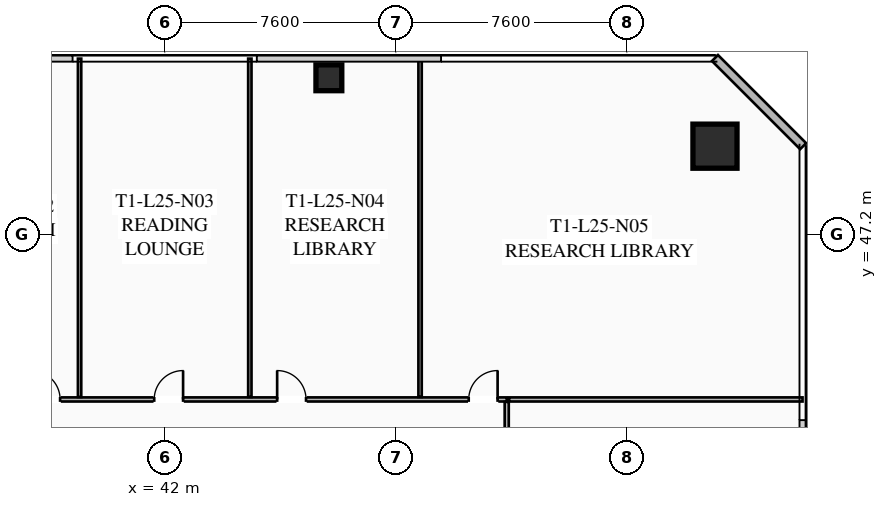
"""IFC4 building model, lengths in metres.
Left out: names, types, materials, properties, quantities, classifications, styles, units other than length and angle.
Written with IfcOpenShell. Run it as: python <this file> out.ifc"""

import sys

from ifc_helpers import new_model, si_unit, direction, frame, frame_2d, origin, origin_2d, place, context, subcontext, project, spatial, rectangle, hollow_rectangle, extrude, element, fill, save


model = new_model("IFC4")
c1 = context("Model", 3, precision=1e-05, world=origin(), true_north=direction((0.0, 1.0)))
c2 = subcontext(c1, "Body", "Model", "MODEL_VIEW")
j1 = project(units=[si_unit("LENGTHUNIT", "METRE"), si_unit("PLANEANGLEUNIT", "RADIAN")], contexts=[c1])
p1 = place(None, origin())
s1 = spatial("IfcSite", under=j1, at=p1, CompositionType="ELEMENT")
p2 = place(p1, origin())
s2 = spatial("IfcBuilding", under=s1, at=p2, CompositionType="ELEMENT")
p3 = place(p2, frame((0.0, 0.0, 95.6)))
s3 = spatial("IfcBuildingStorey", under=s2, at=p3, CompositionType="ELEMENT", Elevation=95.6)
p4 = place(p3, frame((60.1, 50.1, 0.0), z_axis=(0.0, 0.0, 1.0), x_axis=(1.0, 0.0, 0.0)))
e1 = element("IfcColumn", 1, at=p4, inside=s3, PredefinedType="COLUMN", context=c2, shape_type="SweptSolid", body=[
    extrude(hollow_rectangle(XDim=1.45, YDim=1.45, WallThickness=0.055, at=origin_2d()), origin(), (0.0, 0.0, 1.0), 3.35),
])
p5 = place(p3, frame((47.4, 52.35, 0.0), z_axis=(0.0, 0.0, 1.0), x_axis=(1.0, 0.0, 0.0)))
e2 = element("IfcColumn", 2, at=p5, inside=s3, PredefinedType="COLUMN", context=c2, shape_type="SweptSolid", body=[
    extrude(hollow_rectangle(XDim=0.85, YDim=0.85, WallThickness=0.035, at=origin_2d()), origin(), (0.0, 0.0, 1.0), 3.35),
])
p6 = place(p3, frame((60.1, 53.0, 0.0), z_axis=(0.0, 0.0, 1.0), x_axis=(0.707106781187, -0.707106781187, 0.0)))
e3 = element("IfcWall", 3, at=p6, inside=s3, PredefinedType="SOLIDWALL", context=c2, shape_type="SweptSolid", body=[
    extrude(rectangle(XDim=4.101, YDim=0.28, at=frame_2d((2.051, 0.0))), origin(), (0.0, 0.0, 1.0), 3.35),
])
p7 = place(p3, frame((24.05, 41.77, 0.0), z_axis=(0.0, 0.0, 1.0), x_axis=(1.0, 0.0, 0.0)))
e4 = element("IfcWall", 4, at=p7, inside=s3, PredefinedType="PARTITIONING", context=c2, shape_type="SweptSolid", body=[
    extrude(rectangle(XDim=29.2, YDim=0.135, at=frame_2d((14.6, 0.0))), origin(), (0.0, 0.0, 1.0), 2.703),
])
p8 = place(p7, frame((0.3, 0.0, 0.0)))
e5 = element("IfcOpeningElement", 5, at=p8, cuts=e4, PredefinedType="OPENING", context=c2, shape_type="SweptSolid", body=[
    extrude(rectangle(XDim=0.95, YDim=2.05, at=frame_2d((0.475, 1.025))), frame((0.0, 0.077, 0.0), z_axis=(0.0, -1.0, 0.0), x_axis=(1.0, 0.0, 0.0)), (0.0, 0.0, 1.0), 0.155),
])
p9 = place(p7, frame((13.559, 0.0, 0.0)))
e6 = element("IfcOpeningElement", 6, at=p9, cuts=e4, PredefinedType="OPENING", context=c2, shape_type="SweptSolid", body=[
    extrude(rectangle(XDim=0.95, YDim=2.05, at=frame_2d((0.475, 1.025))), frame((0.0, 0.077, 0.0), z_axis=(0.0, -1.0, 0.0), x_axis=(1.0, 0.0, 0.0)), (0.0, 0.0, 1.0), 0.155),
])
p10 = place(p7, frame((17.605, 0.0, 0.0)))
e7 = element("IfcOpeningElement", 7, at=p10, cuts=e4, PredefinedType="OPENING", context=c2, shape_type="SweptSolid", body=[
    extrude(rectangle(XDim=0.95, YDim=2.05, at=frame_2d((0.475, 1.025))), frame((0.0, 0.077, 0.0), z_axis=(0.0, -1.0, 0.0), x_axis=(1.0, 0.0, 0.0)), (0.0, 0.0, 1.0), 0.155),
])
p11 = place(p7, frame((21.649, 0.0, 0.0)))
e8 = element("IfcOpeningElement", 8, at=p11, cuts=e4, PredefinedType="OPENING", context=c2, shape_type="SweptSolid", body=[
    extrude(rectangle(XDim=0.95, YDim=2.05, at=frame_2d((0.475, 1.025))), frame((0.0, 0.077, 0.0), z_axis=(0.0, -1.0, 0.0), x_axis=(1.0, 0.0, 0.0)), (0.0, 0.0, 1.0), 0.155),
])
p12 = place(p7, frame((27.95, 0.0, 0.0)))
e9 = element("IfcOpeningElement", 9, at=p12, cuts=e4, PredefinedType="OPENING", context=c2, shape_type="SweptSolid", body=[
    extrude(rectangle(XDim=0.95, YDim=2.05, at=frame_2d((0.475, 1.025))), frame((0.0, 0.077, 0.0), z_axis=(0.0, -1.0, 0.0), x_axis=(1.0, 0.0, 0.0)), (0.0, 0.0, 1.0), 0.155),
])
for number, where, z_axis, x_axis in (
    (10, (39.2, 41.85, 0.0), (0.0, 0.0, 1.0), (0.0, 1.0, 0.0)),
    (11, (44.8, 41.85, 0.0), (0.0, 0.0, 1.0), (0.0, 1.0, 0.0)),
    (12, (50.4, 41.85, 0.0), (0.0, 0.0, 1.0), (0.0, 1.0, 0.0)),
):
    element("IfcWall", number, at=place(p3, frame(where, z_axis=z_axis, x_axis=x_axis)), inside=s3, PredefinedType="PARTITIONING", context=c2, shape_type="SweptSolid", body=[
        extrude(rectangle(XDim=11.13, YDim=0.11, at=frame_2d((5.565, 0.0))), origin(), (0.0, 0.0, 1.0), 2.703),
    ])
p13 = place(p3, frame((53.25, 41.69, 0.0), z_axis=(0.0, 0.0, 1.0), x_axis=(0.0, -1.0, 0.0)))
e13 = element("IfcWall", 13, at=p13, inside=s3, PredefinedType="PARTITIONING", context=c2, shape_type="SweptSolid", body=[
    extrude(rectangle(XDim=20.11, YDim=0.135, at=frame_2d((10.055, 0.0))), origin(), (0.0, 0.0, 1.0), 2.703),
])
p14 = place(p13, frame((9.078, 0.0, 0.0)))
e14 = element("IfcOpeningElement", 14, at=p14, cuts=e13, PredefinedType="OPENING", context=c2, shape_type="SweptSolid", body=[
    extrude(rectangle(XDim=0.95, YDim=2.05, at=frame_2d((0.475, 1.025))), frame((0.0, 0.077, 0.0), z_axis=(0.0, -1.0, 0.0), x_axis=(1.0, 0.0, 0.0)), (0.0, 0.0, 1.0), 0.155),
])
p15 = place(p3, frame((62.98, 41.77, 0.0), z_axis=(0.0, 0.0, 1.0), x_axis=(-1.0, 0.0, 0.0)))
e15 = element("IfcWall", 15, at=p15, inside=s3, PredefinedType="PARTITIONING", context=c2, shape_type="SweptSolid", body=[
    extrude(rectangle(XDim=9.65, YDim=0.135, at=frame_2d((4.825, 0.0))), origin(), (0.0, 0.0, 1.0), 2.703),
])
p16 = place(p9, origin())
e16 = element("IfcDoor", 16, at=p16, inside=s3, OperationType="SINGLE_SWING_LEFT", PredefinedType="DOOR", context=c2, shape_type="SweptSolid", body=[
    extrude(rectangle(XDim=0.95, YDim=2.05, at=frame_2d((0.475, 1.025))), frame((0.0, 0.025, 0.0), z_axis=(0.0, -1.0, 0.0), x_axis=(1.0, 0.0, 0.0)), (0.0, 0.0, 1.0), 0.05),
])
fill(e6, e16)
p17 = place(p10, origin())
e17 = element("IfcDoor", 17, at=p17, inside=s3, OperationType="SINGLE_SWING_RIGHT", PredefinedType="DOOR", context=c2, shape_type="SweptSolid", body=[
    extrude(rectangle(XDim=0.95, YDim=2.05, at=frame_2d((0.475, 1.025))), frame((0.0, 0.025, 0.0), z_axis=(0.0, -1.0, 0.0), x_axis=(1.0, 0.0, 0.0)), (0.0, 0.0, 1.0), 0.05),
])
fill(e7, e17)
p18 = place(p11, origin())
e18 = element("IfcDoor", 18, at=p18, inside=s3, OperationType="SINGLE_SWING_LEFT", PredefinedType="DOOR", context=c2, shape_type="SweptSolid", body=[
    extrude(rectangle(XDim=0.95, YDim=2.05, at=frame_2d((0.475, 1.025))), frame((0.0, 0.025, 0.0), z_axis=(0.0, -1.0, 0.0), x_axis=(1.0, 0.0, 0.0)), (0.0, 0.0, 1.0), 0.05),
])
fill(e8, e18)
p19 = place(p12, origin())
e19 = element("IfcDoor", 19, at=p19, inside=s3, OperationType="SINGLE_SWING_RIGHT", PredefinedType="DOOR", context=c2, shape_type="SweptSolid", body=[
    extrude(rectangle(XDim=0.95, YDim=2.05, at=frame_2d((0.475, 1.025))), frame((0.0, 0.025, 0.0), z_axis=(0.0, -1.0, 0.0), x_axis=(1.0, 0.0, 0.0)), (0.0, 0.0, 1.0), 0.05),
])
fill(e9, e19)
save(model, sys.argv[1])
